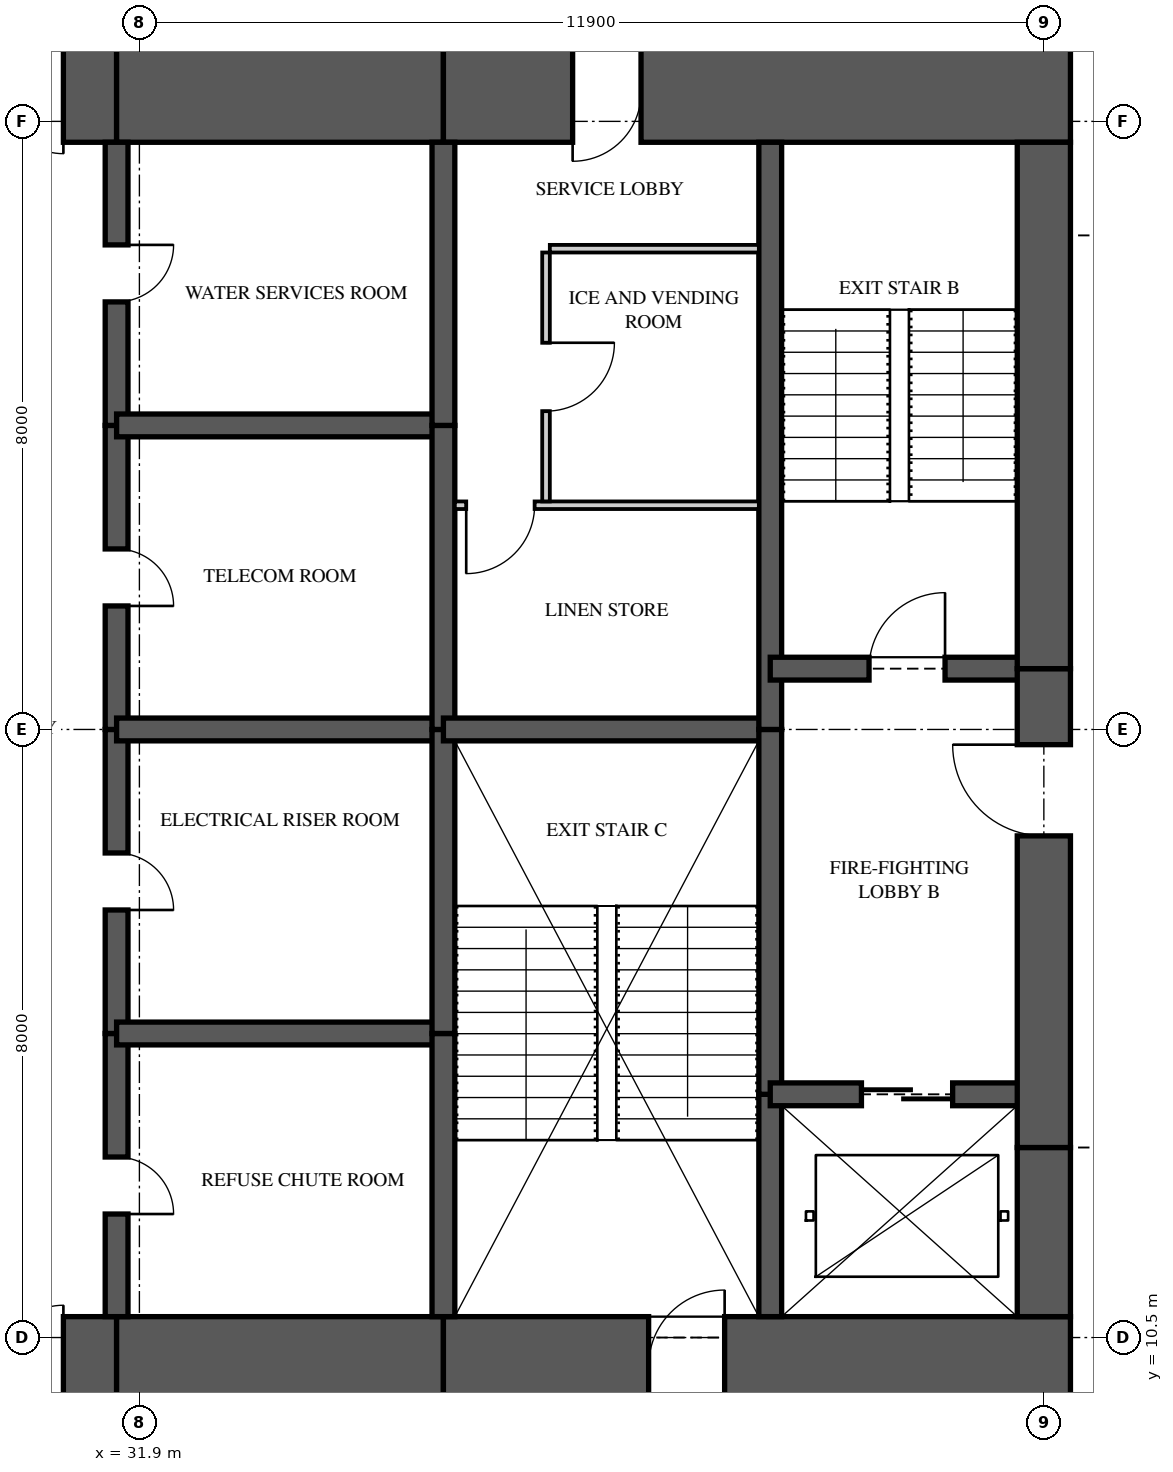
"""IFC4 building model, lengths in metres.
Left out: names, types, materials, properties, quantities, classifications, styles, units other than length and angle.
Written with IfcOpenShell. Run it as: python <this file> out.ifc"""

import sys

from ifc_helpers import new_model, si_unit, direction, frame, frame_2d, origin, place, context, subcontext, project, spatial, rectangle, extrude, element, fill, save


model = new_model("IFC4")
c1 = context("Model", 3, precision=1e-05, world=origin(), true_north=direction((0.0, 1.0)))
c2 = subcontext(c1, "Body", "Model", "MODEL_VIEW")
j1 = project(units=[si_unit("LENGTHUNIT", "METRE"), si_unit("PLANEANGLEUNIT", "RADIAN")], contexts=[c1])
p1 = place(None, origin())
s1 = spatial("IfcSite", under=j1, at=p1, CompositionType="ELEMENT")
p2 = place(p1, origin())
s2 = spatial("IfcBuilding", under=s1, at=p2, CompositionType="ELEMENT")
p3 = place(p2, frame((0.0, 0.0, 197.9)))
s3 = spatial("IfcBuildingStorey", under=s2, at=p3, CompositionType="ELEMENT", Elevation=197.9)
p4 = place(p3, frame((26.0, 10.125, 0.0), z_axis=(0.0, 0.0, 1.0), x_axis=(1.0, 0.0, 0.0)))
e1 = element("IfcWall", 1, at=p4, inside=s3, PredefinedType="SHEAR", context=c2, shape_type="SweptSolid", body=[
    extrude(rectangle(XDim=5.6, YDim=1.3, at=frame_2d((2.8, 0.0))), origin(), (0.0, 0.0, 1.0), 3.35),
])
p5 = place(p4, frame((3.3, 0.0, 0.0)))
e2 = element("IfcOpeningElement", 2, at=p5, cuts=e1, PredefinedType="OPENING", context=c2, shape_type="SweptSolid", body=[
    extrude(rectangle(XDim=1.6, YDim=2.1, at=frame_2d((0.8, 1.05))), frame((0.0, 0.66, 0.0), z_axis=(0.0, -1.0, 0.0), x_axis=(1.0, 0.0, 0.0)), (0.0, 0.0, 1.0), 1.32),
])
p6 = place(p3, frame((31.6, 10.125, 0.0), z_axis=(0.0, 0.0, 1.0), x_axis=(1.0, 0.0, 0.0)))
e3 = element("IfcWall", 3, at=p6, inside=s3, PredefinedType="SHEAR", context=c2, shape_type="SweptSolid", body=[
    extrude(rectangle(XDim=4.3, YDim=1.3, at=frame_2d((2.15, 0.0))), origin(), (0.0, 0.0, 1.0), 3.35),
])
p7 = place(p3, frame((35.9, 10.125, 0.0), z_axis=(0.0, 0.0, 1.0), x_axis=(1.0, 0.0, 0.0)))
e4 = element("IfcWall", 4, at=p7, inside=s3, PredefinedType="SHEAR", context=c2, shape_type="SweptSolid", body=[
    extrude(rectangle(XDim=8.25, YDim=1.3, at=frame_2d((4.125, 0.0))), origin(), (0.0, 0.0, 1.0), 3.35),
])
p8 = place(p7, frame((2.7, 0.0, 0.0)))
e5 = element("IfcOpeningElement", 5, at=p8, cuts=e4, PredefinedType="OPENING", context=c2, shape_type="SweptSolid", body=[
    extrude(rectangle(XDim=1.0, YDim=2.1, at=frame_2d((0.5, 1.05))), frame((0.0, 0.66, 0.0), z_axis=(0.0, -1.0, 0.0), x_axis=(1.0, 0.0, 0.0)), (0.0, 0.0, 1.0), 1.32),
])
p9 = place(p3, frame((44.15, 26.875, 0.0), z_axis=(0.0, 0.0, 1.0), x_axis=(-1.0, 0.0, 0.0)))
e6 = element("IfcWall", 6, at=p9, inside=s3, PredefinedType="SHEAR", context=c2, shape_type="SweptSolid", body=[
    extrude(rectangle(XDim=8.25, YDim=1.3, at=frame_2d((4.125, 0.0))), origin(), (0.0, 0.0, 1.0), 3.35),
])
p10 = place(p9, frame((5.65, 0.0, 0.0)))
e7 = element("IfcOpeningElement", 7, at=p10, cuts=e6, PredefinedType="OPENING", context=c2, shape_type="SweptSolid", body=[
    extrude(rectangle(XDim=0.9, YDim=2.1, at=frame_2d((0.45, 1.05))), frame((0.0, 0.66, 0.0), z_axis=(0.0, -1.0, 0.0), x_axis=(1.0, 0.0, 0.0)), (0.0, 0.0, 1.0), 1.32),
])
p11 = place(p3, frame((35.9, 26.875, 0.0), z_axis=(0.0, 0.0, 1.0), x_axis=(-1.0, 0.0, 0.0)))
e8 = element("IfcWall", 8, at=p11, inside=s3, PredefinedType="SHEAR", context=c2, shape_type="SweptSolid", body=[
    extrude(rectangle(XDim=4.3, YDim=1.3, at=frame_2d((2.15, 0.0))), origin(), (0.0, 0.0, 1.0), 3.35),
])
p12 = place(p3, frame((31.6, 26.875, 0.0), z_axis=(0.0, 0.0, 1.0), x_axis=(-1.0, 0.0, 0.0)))
e9 = element("IfcWall", 9, at=p12, inside=s3, PredefinedType="SHEAR", context=c2, shape_type="SweptSolid", body=[
    extrude(rectangle(XDim=5.6, YDim=1.3, at=frame_2d((2.8, 0.0))), origin(), (0.0, 0.0, 1.0), 3.35),
])
p13 = place(p12, frame((0.7, 0.0, 0.0)))
e10 = element("IfcOpeningElement", 10, at=p13, cuts=e9, PredefinedType="OPENING", context=c2, shape_type="SweptSolid", body=[
    extrude(rectangle(XDim=1.6, YDim=2.1, at=frame_2d((0.8, 1.05))), frame((0.0, 0.66, 0.0), z_axis=(0.0, -1.0, 0.0), x_axis=(1.0, 0.0, 0.0)), (0.0, 0.0, 1.0), 1.32),
])
p14 = place(p3, frame((43.8, 10.775, 0.0), z_axis=(0.0, 0.0, 1.0), x_axis=(0.0, 1.0, 0.0)))
e11 = element("IfcWall", 11, at=p14, inside=s3, PredefinedType="SHEAR", context=c2, shape_type="SweptSolid", body=[
    extrude(rectangle(XDim=2.225, YDim=0.7, at=frame_2d((1.113, 0.0))), origin(), (0.0, 0.0, 1.0), 3.35),
])
p15 = place(p3, frame((43.8, 13.0, 0.0), z_axis=(0.0, 0.0, 1.0), x_axis=(0.0, 1.0, 0.0)))
e12 = element("IfcWall", 12, at=p15, inside=s3, PredefinedType="SHEAR", context=c2, shape_type="SweptSolid", body=[
    extrude(rectangle(XDim=6.3, YDim=0.7, at=frame_2d((3.15, 0.0))), origin(), (0.0, 0.0, 1.0), 3.35),
])
p16 = place(p15, frame((4.1, 0.0, 0.0)))
e13 = element("IfcOpeningElement", 13, at=p16, cuts=e12, PredefinedType="OPENING", context=c2, shape_type="SweptSolid", body=[
    extrude(rectangle(XDim=1.2, YDim=2.2, at=frame_2d((0.6, 1.1))), frame((0.0, 0.36, 0.0), z_axis=(0.0, -1.0, 0.0), x_axis=(1.0, 0.0, 0.0)), (0.0, 0.0, 1.0), 0.72),
])
p17 = place(p3, frame((43.8, 19.3, 0.0), z_axis=(0.0, 0.0, 1.0), x_axis=(0.0, 1.0, 0.0)))
e14 = element("IfcWall", 14, at=p17, inside=s3, PredefinedType="SHEAR", context=c2, shape_type="SweptSolid", body=[
    extrude(rectangle(XDim=6.925, YDim=0.7, at=frame_2d((3.462, 0.0))), origin(), (0.0, 0.0, 1.0), 3.35),
])
p18 = place(p3, frame((31.6, 10.775, 0.0), z_axis=(0.0, 0.0, 1.0), x_axis=(0.0, 1.0, 0.0)))
e15 = element("IfcWall", 15, at=p18, inside=s3, PredefinedType="SHEAR", context=c2, shape_type="SweptSolid", body=[
    extrude(rectangle(XDim=3.725, YDim=0.3, at=frame_2d((1.863, 0.0))), origin(), (0.0, 0.0, 1.0), 3.35),
])
p19 = place(p18, frame((1.35, 0.0, 0.0)))
e16 = element("IfcOpeningElement", 16, at=p19, cuts=e15, PredefinedType="OPENING", context=c2, shape_type="SweptSolid", body=[
    extrude(rectangle(XDim=0.75, YDim=2.1, at=frame_2d((0.375, 1.05))), frame((0.0, 0.16, 0.0), z_axis=(0.0, -1.0, 0.0), x_axis=(1.0, 0.0, 0.0)), (0.0, 0.0, 1.0), 0.32),
])
p20 = place(p3, frame((31.6, 14.5, 0.0), z_axis=(0.0, 0.0, 1.0), x_axis=(0.0, 1.0, 0.0)))
e17 = element("IfcWall", 17, at=p20, inside=s3, PredefinedType="SHEAR", context=c2, shape_type="SweptSolid", body=[
    extrude(rectangle(XDim=4.0, YDim=0.3, at=frame_2d((2.0, 0.0))), origin(), (0.0, 0.0, 1.0), 3.35),
])
p21 = place(p20, frame((1.625, 0.0, 0.0)))
e18 = element("IfcOpeningElement", 18, at=p21, cuts=e17, PredefinedType="OPENING", context=c2, shape_type="SweptSolid", body=[
    extrude(rectangle(XDim=0.75, YDim=2.1, at=frame_2d((0.375, 1.05))), frame((0.0, 0.16, 0.0), z_axis=(0.0, -1.0, 0.0), x_axis=(1.0, 0.0, 0.0)), (0.0, 0.0, 1.0), 0.32),
])
p22 = place(p3, frame((31.6, 18.5, 0.0), z_axis=(0.0, 0.0, 1.0), x_axis=(0.0, 1.0, 0.0)))
e19 = element("IfcWall", 19, at=p22, inside=s3, PredefinedType="SHEAR", context=c2, shape_type="SweptSolid", body=[
    extrude(rectangle(XDim=4.0, YDim=0.3, at=frame_2d((2.0, 0.0))), origin(), (0.0, 0.0, 1.0), 3.35),
])
p23 = place(p22, frame((1.625, 0.0, 0.0)))
e20 = element("IfcOpeningElement", 20, at=p23, cuts=e19, PredefinedType="OPENING", context=c2, shape_type="SweptSolid", body=[
    extrude(rectangle(XDim=0.75, YDim=2.1, at=frame_2d((0.375, 1.05))), frame((0.0, 0.16, 0.0), z_axis=(0.0, -1.0, 0.0), x_axis=(1.0, 0.0, 0.0)), (0.0, 0.0, 1.0), 0.32),
])
p24 = place(p3, frame((31.6, 22.5, 0.0), z_axis=(0.0, 0.0, 1.0), x_axis=(0.0, 1.0, 0.0)))
e21 = element("IfcWall", 21, at=p24, inside=s3, PredefinedType="SHEAR", context=c2, shape_type="SweptSolid", body=[
    extrude(rectangle(XDim=3.725, YDim=0.3, at=frame_2d((1.863, 0.0))), origin(), (0.0, 0.0, 1.0), 3.35),
])
p25 = place(p24, frame((1.625, 0.0, 0.0)))
e22 = element("IfcOpeningElement", 22, at=p25, cuts=e21, PredefinedType="OPENING", context=c2, shape_type="SweptSolid", body=[
    extrude(rectangle(XDim=0.75, YDim=2.1, at=frame_2d((0.375, 1.05))), frame((0.0, 0.16, 0.0), z_axis=(0.0, -1.0, 0.0), x_axis=(1.0, 0.0, 0.0)), (0.0, 0.0, 1.0), 0.32),
])
p26 = place(p3, frame((35.9, 10.775, 0.0), z_axis=(0.0, 0.0, 1.0), x_axis=(0.0, 1.0, 0.0)))
e23 = element("IfcWall", 23, at=p26, inside=s3, PredefinedType="SHEAR", context=c2, shape_type="SweptSolid", body=[
    extrude(rectangle(XDim=3.725, YDim=0.3, at=frame_2d((1.863, 0.0))), origin(), (0.0, 0.0, 1.0), 3.35),
])
for number, where, z_axis, x_axis in (
    (24, (35.9, 14.5, 0.0), (0.0, 0.0, 1.0), (0.0, 1.0, 0.0)),
    (25, (35.9, 18.5, 0.0), (0.0, 0.0, 1.0), (0.0, 1.0, 0.0)),
):
    element("IfcWall", number, at=place(p3, frame(where, z_axis=z_axis, x_axis=x_axis)), inside=s3, PredefinedType="SHEAR", context=c2, shape_type="SweptSolid", body=[
        extrude(rectangle(XDim=4.0, YDim=0.3, at=frame_2d((2.0, 0.0))), origin(), (0.0, 0.0, 1.0), 3.35),
    ])
p27 = place(p3, frame((35.9, 22.5, 0.0), z_axis=(0.0, 0.0, 1.0), x_axis=(0.0, 1.0, 0.0)))
e26 = element("IfcWall", 26, at=p27, inside=s3, PredefinedType="SHEAR", context=c2, shape_type="SweptSolid", body=[
    extrude(rectangle(XDim=3.725, YDim=0.3, at=frame_2d((1.863, 0.0))), origin(), (0.0, 0.0, 1.0), 3.35),
])
p28 = place(p3, frame((40.2, 10.775, 0.0), z_axis=(0.0, 0.0, 1.0), x_axis=(0.0, 1.0, 0.0)))
e27 = element("IfcWall", 27, at=p28, inside=s3, PredefinedType="SHEAR", context=c2, shape_type="SweptSolid", body=[
    extrude(rectangle(XDim=2.925, YDim=0.3, at=frame_2d((1.462, 0.0))), origin(), (0.0, 0.0, 1.0), 3.35),
])
p29 = place(p3, frame((40.2, 13.7, 0.0), z_axis=(0.0, 0.0, 1.0), x_axis=(0.0, 1.0, 0.0)))
e28 = element("IfcWall", 28, at=p29, inside=s3, PredefinedType="SHEAR", context=c2, shape_type="SweptSolid", body=[
    extrude(rectangle(XDim=4.8, YDim=0.3, at=frame_2d((2.4, 0.0))), origin(), (0.0, 0.0, 1.0), 3.35),
])
p30 = place(p3, frame((40.2, 18.5, 0.0), z_axis=(0.0, 0.0, 1.0), x_axis=(0.0, 1.0, 0.0)))
e29 = element("IfcWall", 29, at=p30, inside=s3, PredefinedType="SHEAR", context=c2, shape_type="SweptSolid", body=[
    extrude(rectangle(XDim=7.725, YDim=0.3, at=frame_2d((3.863, 0.0))), origin(), (0.0, 0.0, 1.0), 3.35),
])
for number, where, z_axis, x_axis in (
    (30, (31.6, 14.5, 0.0), (0.0, 0.0, 1.0), (1.0, 0.0, 0.0)),
    (31, (31.6, 18.5, 0.0), (0.0, 0.0, 1.0), (1.0, 0.0, 0.0)),
    (32, (31.6, 22.5, 0.0), (0.0, 0.0, 1.0), (1.0, 0.0, 0.0)),
):
    element("IfcWall", number, at=place(p3, frame(where, z_axis=z_axis, x_axis=x_axis)), inside=s3, PredefinedType="SHEAR", context=c2, shape_type="SweptSolid", body=[
        extrude(rectangle(XDim=4.3, YDim=0.3, at=frame_2d((2.15, 0.0))), origin(), (0.0, 0.0, 1.0), 3.35),
    ])
p31 = place(p3, frame((35.9, 18.5, 0.0), z_axis=(0.0, 0.0, 1.0), x_axis=(1.0, 0.0, 0.0)))
e33 = element("IfcWall", 33, at=p31, inside=s3, PredefinedType="SHEAR", context=c2, shape_type="SweptSolid", body=[
    extrude(rectangle(XDim=4.3, YDim=0.3, at=frame_2d((2.15, 0.0))), origin(), (0.0, 0.0, 1.0), 3.35),
])
p32 = place(p3, frame((40.2, 13.7, 0.0), z_axis=(0.0, 0.0, 1.0), x_axis=(1.0, 0.0, 0.0)))
e34 = element("IfcWall", 34, at=p32, inside=s3, PredefinedType="SHEAR", context=c2, shape_type="SweptSolid", body=[
    extrude(rectangle(XDim=3.6, YDim=0.3, at=frame_2d((1.8, 0.0))), origin(), (0.0, 0.0, 1.0), 3.35),
])
p33 = place(p32, frame((1.2, 0.0, 0.0)))
e35 = element("IfcOpeningElement", 35, at=p33, cuts=e34, PredefinedType="OPENING", context=c2, shape_type="SweptSolid", body=[
    extrude(rectangle(XDim=1.2, YDim=2.1, at=frame_2d((0.6, 1.05))), frame((0.0, 0.16, 0.0), z_axis=(0.0, -1.0, 0.0), x_axis=(1.0, 0.0, 0.0)), (0.0, 0.0, 1.0), 0.32),
])
p34 = place(p3, frame((40.2, 19.3, 0.0), z_axis=(0.0, 0.0, 1.0), x_axis=(1.0, 0.0, 0.0)))
e36 = element("IfcWall", 36, at=p34, inside=s3, PredefinedType="SHEAR", context=c2, shape_type="SweptSolid", body=[
    extrude(rectangle(XDim=3.6, YDim=0.3, at=frame_2d((1.8, 0.0))), origin(), (0.0, 0.0, 1.0), 3.35),
])
p35 = place(p34, frame((1.3, 0.0, 0.0)))
e37 = element("IfcOpeningElement", 37, at=p35, cuts=e36, PredefinedType="OPENING", context=c2, shape_type="SweptSolid", body=[
    extrude(rectangle(XDim=1.0, YDim=2.1, at=frame_2d((0.5, 1.05))), frame((0.0, 0.16, 0.0), z_axis=(0.0, -1.0, 0.0), x_axis=(1.0, 0.0, 0.0)), (0.0, 0.0, 1.0), 0.32),
])
p36 = place(p3, frame((37.3, 24.825, 0.0), z_axis=(0.0, 0.0, 1.0), x_axis=(1.0, 0.0, 0.0)))
e38 = element("IfcWall", 38, at=p36, inside=s3, PredefinedType="PARTITIONING", context=c2, shape_type="SweptSolid", body=[
    extrude(rectangle(XDim=2.75, YDim=0.1, at=frame_2d((1.375, 0.0))), origin(), (0.0, 0.0, 1.0), 3.11),
])
p37 = place(p3, frame((37.25, 21.5, 0.0), z_axis=(0.0, 0.0, 1.0), x_axis=(0.0, 1.0, 0.0)))
e39 = element("IfcWall", 39, at=p37, inside=s3, PredefinedType="PARTITIONING", context=c2, shape_type="SweptSolid", body=[
    extrude(rectangle(XDim=3.275, YDim=0.1, at=frame_2d((1.637, 0.0))), origin(), (0.0, 0.0, 1.0), 3.11),
])
p38 = place(p37, frame((1.188, 0.0, 0.0)))
e40 = element("IfcOpeningElement", 40, at=p38, cuts=e39, PredefinedType="OPENING", context=c2, shape_type="SweptSolid", body=[
    extrude(rectangle(XDim=0.9, YDim=2.1, at=frame_2d((0.45, 1.05))), frame((0.0, 0.06, 0.0), z_axis=(0.0, -1.0, 0.0), x_axis=(1.0, 0.0, 0.0)), (0.0, 0.0, 1.0), 0.12),
])
p39 = place(p3, frame((36.05, 21.45, 0.0), z_axis=(0.0, 0.0, 1.0), x_axis=(1.0, 0.0, 0.0)))
e41 = element("IfcWall", 41, at=p39, inside=s3, PredefinedType="PARTITIONING", context=c2, shape_type="SweptSolid", body=[
    extrude(rectangle(XDim=4.0, YDim=0.1, at=frame_2d((2.0, 0.0))), origin(), (0.0, 0.0, 1.0), 3.11),
])
p40 = place(p39, frame((0.15, 0.0, 0.0)))
e42 = element("IfcOpeningElement", 42, at=p40, cuts=e41, PredefinedType="OPENING", context=c2, shape_type="SweptSolid", body=[
    extrude(rectangle(XDim=0.9, YDim=2.1, at=frame_2d((0.45, 1.05))), frame((0.0, 0.06, 0.0), z_axis=(0.0, -1.0, 0.0), x_axis=(1.0, 0.0, 0.0)), (0.0, 0.0, 1.0), 0.12),
])
p41 = place(p38, frame((0.9, 0.0, 0.0), z_axis=(0.0, 0.0, 1.0), x_axis=(-1.0, 0.0, 0.0)))
e43 = element("IfcDoor", 43, at=p41, inside=s3, OperationType="SINGLE_SWING_LEFT", PredefinedType="DOOR", context=c2, shape_type="SweptSolid", body=[
    extrude(rectangle(XDim=0.9, YDim=2.1, at=frame_2d((0.45, 1.05))), frame((0.0, 0.025, 0.0), z_axis=(0.0, -1.0, 0.0), x_axis=(1.0, 0.0, 0.0)), (0.0, 0.0, 1.0), 0.05),
])
fill(e40, e43)
p42 = place(p40, frame((0.9, 0.0, 0.0), z_axis=(0.0, 0.0, 1.0), x_axis=(-1.0, 0.0, 0.0)))
e44 = element("IfcDoor", 44, at=p42, inside=s3, OperationType="SINGLE_SWING_RIGHT", PredefinedType="DOOR", context=c2, shape_type="SweptSolid", body=[
    extrude(rectangle(XDim=0.9, YDim=2.1, at=frame_2d((0.45, 1.05))), frame((0.0, 0.025, 0.0), z_axis=(0.0, -1.0, 0.0), x_axis=(1.0, 0.0, 0.0)), (0.0, 0.0, 1.0), 0.05),
])
fill(e42, e44)
p43 = place(p35, origin())
e45 = element("IfcDoor", 45, at=p43, inside=s3, OperationType="SINGLE_SWING_RIGHT", PredefinedType="DOOR", context=c2, shape_type="SweptSolid", body=[
    extrude(rectangle(XDim=1.0, YDim=2.1, at=frame_2d((0.5, 1.05))), frame((0.0, 0.025, 0.0), z_axis=(0.0, -1.0, 0.0), x_axis=(1.0, 0.0, 0.0)), (0.0, 0.0, 1.0), 0.05),
])
fill(e37, e45)
p44 = place(p16, origin())
e46 = element("IfcDoor", 46, at=p44, inside=s3, OperationType="SINGLE_SWING_RIGHT", PredefinedType="DOOR", context=c2, shape_type="SweptSolid", body=[
    extrude(rectangle(XDim=1.2, YDim=2.2, at=frame_2d((0.6, 1.1))), frame((0.0, 0.025, 0.0), z_axis=(0.0, -1.0, 0.0), x_axis=(1.0, 0.0, 0.0)), (0.0, 0.0, 1.0), 0.05),
])
fill(e13, e46)
p45 = place(p33, origin())
e47 = element("IfcDoor", 47, at=p45, inside=s3, OperationType="SLIDING_TO_LEFT", PredefinedType="DOOR", context=c2, shape_type="SweptSolid", body=[
    extrude(rectangle(XDim=1.2, YDim=2.1, at=frame_2d((0.6, 1.05))), frame((0.0, 0.025, 0.0), z_axis=(0.0, -1.0, 0.0), x_axis=(1.0, 0.0, 0.0)), (0.0, 0.0, 1.0), 0.05),
])
fill(e35, e47)
p46 = place(p5, origin())
e48 = element("IfcDoor", 48, at=p46, inside=s3, OperationType="DOUBLE_DOOR_SINGLE_SWING", PredefinedType="DOOR", context=c2, shape_type="SweptSolid", body=[
    extrude(rectangle(XDim=1.6, YDim=2.1, at=frame_2d((0.8, 1.05))), frame((0.0, 0.025, 0.0), z_axis=(0.0, -1.0, 0.0), x_axis=(1.0, 0.0, 0.0)), (0.0, 0.0, 1.0), 0.05),
])
fill(e2, e48)
p47 = place(p13, origin())
e49 = element("IfcDoor", 49, at=p47, inside=s3, OperationType="DOUBLE_DOOR_SINGLE_SWING", PredefinedType="DOOR", context=c2, shape_type="SweptSolid", body=[
    extrude(rectangle(XDim=1.6, YDim=2.1, at=frame_2d((0.8, 1.05))), frame((0.0, 0.025, 0.0), z_axis=(0.0, -1.0, 0.0), x_axis=(1.0, 0.0, 0.0)), (0.0, 0.0, 1.0), 0.05),
])
fill(e10, e49)
p48 = place(p19, frame((0.75, 0.0, 0.0), z_axis=(0.0, 0.0, 1.0), x_axis=(-1.0, 0.0, 0.0)))
e50 = element("IfcDoor", 50, at=p48, inside=s3, OperationType="SINGLE_SWING_RIGHT", PredefinedType="DOOR", context=c2, shape_type="SweptSolid", body=[
    extrude(rectangle(XDim=0.75, YDim=2.1, at=frame_2d((0.375, 1.05))), frame((0.0, 0.025, 0.0), z_axis=(0.0, -1.0, 0.0), x_axis=(1.0, 0.0, 0.0)), (0.0, 0.0, 1.0), 0.05),
])
fill(e16, e50)
p49 = place(p21, frame((0.75, 0.0, 0.0), z_axis=(0.0, 0.0, 1.0), x_axis=(-1.0, 0.0, 0.0)))
e51 = element("IfcDoor", 51, at=p49, inside=s3, OperationType="SINGLE_SWING_RIGHT", PredefinedType="DOOR", context=c2, shape_type="SweptSolid", body=[
    extrude(rectangle(XDim=0.75, YDim=2.1, at=frame_2d((0.375, 1.05))), frame((0.0, 0.025, 0.0), z_axis=(0.0, -1.0, 0.0), x_axis=(1.0, 0.0, 0.0)), (0.0, 0.0, 1.0), 0.05),
])
fill(e18, e51)
p50 = place(p23, frame((0.75, 0.0, 0.0), z_axis=(0.0, 0.0, 1.0), x_axis=(-1.0, 0.0, 0.0)))
e52 = element("IfcDoor", 52, at=p50, inside=s3, OperationType="SINGLE_SWING_RIGHT", PredefinedType="DOOR", context=c2, shape_type="SweptSolid", body=[
    extrude(rectangle(XDim=0.75, YDim=2.1, at=frame_2d((0.375, 1.05))), frame((0.0, 0.025, 0.0), z_axis=(0.0, -1.0, 0.0), x_axis=(1.0, 0.0, 0.0)), (0.0, 0.0, 1.0), 0.05),
])
fill(e20, e52)
p51 = place(p25, frame((0.75, 0.0, 0.0), z_axis=(0.0, 0.0, 1.0), x_axis=(-1.0, 0.0, 0.0)))
e53 = element("IfcDoor", 53, at=p51, inside=s3, OperationType="SINGLE_SWING_LEFT", PredefinedType="DOOR", context=c2, shape_type="SweptSolid", body=[
    extrude(rectangle(XDim=0.75, YDim=2.1, at=frame_2d((0.375, 1.05))), frame((0.0, 0.025, 0.0), z_axis=(0.0, -1.0, 0.0), x_axis=(1.0, 0.0, 0.0)), (0.0, 0.0, 1.0), 0.05),
])
fill(e22, e53)
p52 = place(p8, origin())
e54 = element("IfcDoor", 54, at=p52, inside=s3, OperationType="SINGLE_SWING_RIGHT", PredefinedType="DOOR", context=c2, shape_type="SweptSolid", body=[
    extrude(rectangle(XDim=1.0, YDim=2.1, at=frame_2d((0.5, 1.05))), frame((0.0, 0.025, 0.0), z_axis=(0.0, -1.0, 0.0), x_axis=(1.0, 0.0, 0.0)), (0.0, 0.0, 1.0), 0.05),
])
fill(e5, e54)
p53 = place(p10, origin())
e55 = element("IfcDoor", 55, at=p53, inside=s3, OperationType="SINGLE_SWING_RIGHT", PredefinedType="DOOR", context=c2, shape_type="SweptSolid", body=[
    extrude(rectangle(XDim=0.9, YDim=2.1, at=frame_2d((0.45, 1.05))), frame((0.0, 0.47, 0.0), z_axis=(0.0, -1.0, 0.0), x_axis=(1.0, 0.0, 0.0)), (0.0, 0.0, 1.0), 0.8),
])
fill(e7, e55)
save(model, sys.argv[1])
